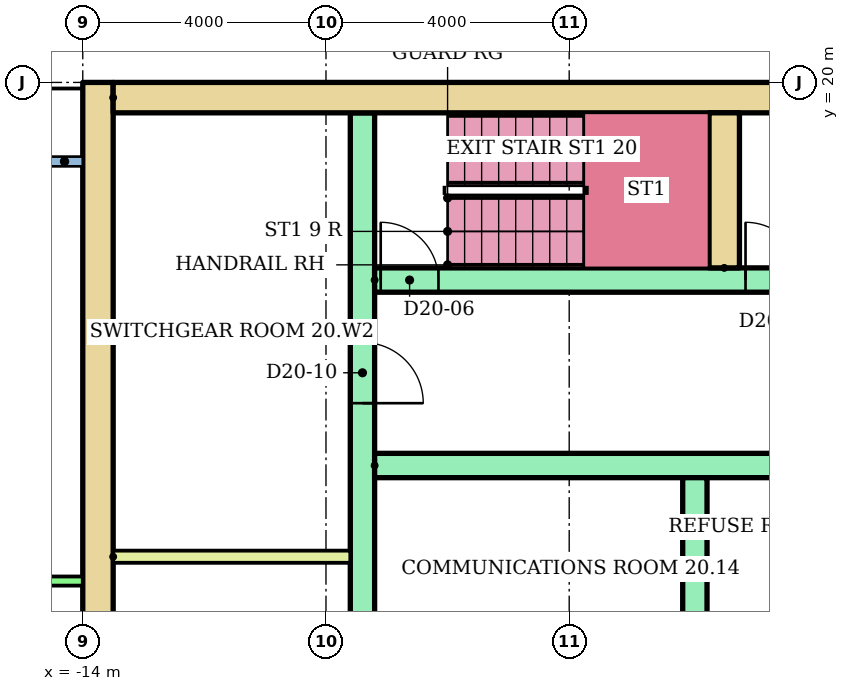
"""IFC4 building model, lengths in metres.
Left out: names, types, materials, properties, quantities, classifications, styles, units other than length and angle.
Written with IfcOpenShell. Run it as: python <this file> out.ifc"""

import sys

from ifc_helpers import new_model, si_unit, direction, frame, frame_2d, origin, place, context, subcontext, project, spatial, rectangle, extrude, element, fill, save


model = new_model("IFC4")
c1 = context("Model", 3, precision=1e-05, world=origin(), true_north=direction((0.0, 1.0)))
c2 = subcontext(c1, "Body", "Model", "MODEL_VIEW")
j1 = project(units=[si_unit("LENGTHUNIT", "METRE"), si_unit("PLANEANGLEUNIT", "RADIAN")], contexts=[c1])
p1 = place(None, origin())
s1 = spatial("IfcSite", under=j1, at=p1, CompositionType="ELEMENT")
p2 = place(p1, origin())
s2 = spatial("IfcBuilding", under=s1, at=p2, CompositionType="ELEMENT")
p3 = place(p2, frame((0.0, 0.0, 80.7)))
s3 = spatial("IfcBuildingStorey", under=s2, at=p3, CompositionType="ELEMENT", Elevation=80.7)
p4 = place(p3, frame((-13.75, 3.0, 0.0), z_axis=(0.0, 0.0, 1.0), x_axis=(0.0, 1.0, 0.0)))
e1 = element("IfcWall", 1, at=p4, inside=s3, PredefinedType="SHEAR", context=c2, shape_type="SweptSolid", body=[
    extrude(rectangle(XDim=17.0, YDim=0.5, at=frame_2d((8.5, 0.0))), origin(), (0.0, 0.0, 1.0), 2.92),
])
p5 = place(p3, frame((-13.5, 19.75, 0.0)))
e2 = element("IfcWall", 2, at=p5, inside=s3, PredefinedType="SHEAR", context=c2, shape_type="SweptSolid", body=[
    extrude(rectangle(XDim=27.0, YDim=0.5, at=frame_2d((13.5, 0.0))), origin(), (0.0, 0.0, 1.0), 2.92),
])
p6 = place(p3, frame((-9.4, 6.8, 0.0), z_axis=(0.0, 0.0, 1.0), x_axis=(0.0, 1.0, 0.0)))
e3 = element("IfcWall", 3, at=p6, inside=s3, PredefinedType="SHEAR", context=c2, shape_type="SweptSolid", body=[
    extrude(rectangle(XDim=12.7, YDim=0.4, at=frame_2d((6.35, 0.0))), origin(), (0.0, 0.0, 1.0), 2.92),
])
p7 = place(p6, frame((1.15, 0.0, 0.0)))
e4 = element("IfcOpeningElement", 4, at=p7, cuts=e3, PredefinedType="OPENING", context=c2, shape_type="SweptSolid", body=[
    extrude(rectangle(XDim=1.0, YDim=2.1, at=frame_2d((0.5, 1.05))), frame((0.0, 0.21, 0.0), z_axis=(0.0, -1.0, 0.0), x_axis=(1.0, 0.0, 0.0)), (0.0, 0.0, 1.0), 0.42),
])
p8 = place(p6, frame((7.925, 0.0, 0.0)))
e5 = element("IfcOpeningElement", 5, at=p8, cuts=e3, PredefinedType="OPENING", context=c2, shape_type="SweptSolid", body=[
    extrude(rectangle(XDim=1.0, YDim=2.1, at=frame_2d((0.5, 1.05))), frame((0.0, 0.21, 0.0), z_axis=(0.0, -1.0, 0.0), x_axis=(1.0, 0.0, 0.0)), (0.0, 0.0, 1.0), 0.42),
])
p9 = place(p3, frame((-9.2, 13.7, 0.0)))
e6 = element("IfcWall", 6, at=p9, inside=s3, PredefinedType="SHEAR", context=c2, shape_type="SweptSolid", body=[
    extrude(rectangle(XDim=8.0, YDim=0.4, at=frame_2d((4.0, 0.0))), origin(), (0.0, 0.0, 1.0), 2.92),
])
p10 = place(p3, frame((-3.933, 10.5, 0.0), z_axis=(0.0, 0.0, 1.0), x_axis=(0.0, 1.0, 0.0)))
e7 = element("IfcWall", 7, at=p10, inside=s3, PredefinedType="SHEAR", context=c2, shape_type="SweptSolid", body=[
    extrude(rectangle(XDim=3.0, YDim=0.4, at=frame_2d((1.5, 0.0))), origin(), (0.0, 0.0, 1.0), 2.92),
])
p11 = place(p3, frame((-9.2, 16.75, 0.0)))
e8 = element("IfcWall", 8, at=p11, inside=s3, PredefinedType="SHEAR", context=c2, shape_type="SweptSolid", body=[
    extrude(rectangle(XDim=18.4, YDim=0.4, at=frame_2d((9.2, 0.0))), origin(), (0.0, 0.0, 1.0), 2.92),
])
p12 = place(p11, frame((0.1, 0.0, 0.0)))
e9 = element("IfcOpeningElement", 9, at=p12, cuts=e8, PredefinedType="OPENING", context=c2, shape_type="SweptSolid", body=[
    extrude(rectangle(XDim=0.95, YDim=2.1, at=frame_2d((0.475, 1.05))), frame((0.0, 0.21, 0.0), z_axis=(0.0, -1.0, 0.0), x_axis=(1.0, 0.0, 0.0)), (0.0, 0.0, 1.0), 0.42),
])
p13 = place(p11, frame((6.1, 0.0, 0.0)))
e10 = element("IfcOpeningElement", 10, at=p13, cuts=e8, PredefinedType="OPENING", context=c2, shape_type="SweptSolid", body=[
    extrude(rectangle(XDim=0.95, YDim=2.1, at=frame_2d((0.475, 1.05))), frame((0.0, 0.21, 0.0), z_axis=(0.0, -1.0, 0.0), x_axis=(1.0, 0.0, 0.0)), (0.0, 0.0, 1.0), 0.42),
])
p14 = place(p11, frame((12.1, 0.0, 0.0)))
e11 = element("IfcOpeningElement", 11, at=p14, cuts=e8, PredefinedType="OPENING", context=c2, shape_type="SweptSolid", body=[
    extrude(rectangle(XDim=0.95, YDim=2.1, at=frame_2d((0.475, 1.05))), frame((0.0, 0.21, 0.0), z_axis=(0.0, -1.0, 0.0), x_axis=(1.0, 0.0, 0.0)), (0.0, 0.0, 1.0), 0.42),
])
p15 = place(p3, frame((-3.45, 16.95, 0.0), z_axis=(0.0, 0.0, 1.0), x_axis=(0.0, 1.0, 0.0)))
e12 = element("IfcWall", 12, at=p15, inside=s3, PredefinedType="SHEAR", context=c2, shape_type="SweptSolid", body=[
    extrude(rectangle(XDim=2.55, YDim=0.5, at=frame_2d((1.275, 0.0))), origin(), (0.0, 0.0, 1.0), 2.92),
])
p16 = place(p3, frame((-13.5, 12.2, 0.0)))
e13 = element("IfcWall", 13, at=p16, inside=s3, PredefinedType="PARTITIONING", context=c2, shape_type="SweptSolid", body=[
    extrude(rectangle(XDim=3.9, YDim=0.2, at=frame_2d((1.95, 0.0))), origin(), (0.0, 0.0, 1.0), 2.92),
])
p17 = place(p3, frame((-28.62, 11.8, 0.0)))
e14 = element("IfcWall", 14, at=p17, inside=s3, PredefinedType="PARTITIONING", context=c2, shape_type="SweptSolid", body=[
    extrude(rectangle(XDim=14.62, YDim=0.15, at=frame_2d((7.31, 0.0))), origin(), (0.0, 0.0, 1.0), 2.4),
])
p18 = place(p17, frame((1.97, 0.0, 0.0)))
e15 = element("IfcOpeningElement", 15, at=p18, cuts=e14, PredefinedType="OPENING", context=c2, shape_type="SweptSolid", body=[
    extrude(rectangle(XDim=1.0, YDim=2.1, at=frame_2d((0.5, 1.05))), frame((0.0, 0.085, 0.0), z_axis=(0.0, -1.0, 0.0), x_axis=(1.0, 0.0, 0.0)), (0.0, 0.0, 1.0), 0.17),
])
p19 = place(p17, frame((9.22, 0.0, 0.0)))
e16 = element("IfcOpeningElement", 16, at=p19, cuts=e14, PredefinedType="OPENING", context=c2, shape_type="SweptSolid", body=[
    extrude(rectangle(XDim=0.9, YDim=2.1, at=frame_2d((0.45, 1.05))), frame((0.0, 0.085, 0.0), z_axis=(0.0, -1.0, 0.0), x_axis=(1.0, 0.0, 0.0)), (0.0, 0.0, 1.0), 0.17),
])
p20 = place(p12, origin())
e17 = element("IfcDoor", 17, at=p20, inside=s3, OperationType="SINGLE_SWING_LEFT", PredefinedType="DOOR", context=c2, shape_type="SweptSolid", body=[
    extrude(rectangle(XDim=0.95, YDim=2.1, at=frame_2d((0.475, 1.05))), frame((0.0, 0.025, 0.0), z_axis=(0.0, -1.0, 0.0), x_axis=(1.0, 0.0, 0.0)), (0.0, 0.0, 1.0), 0.05),
])
fill(e9, e17)
p21 = place(p13, origin())
e18 = element("IfcDoor", 18, at=p21, inside=s3, OperationType="SINGLE_SWING_LEFT", PredefinedType="DOOR", context=c2, shape_type="SweptSolid", body=[
    extrude(rectangle(XDim=0.95, YDim=2.1, at=frame_2d((0.475, 1.05))), frame((0.0, 0.025, 0.0), z_axis=(0.0, -1.0, 0.0), x_axis=(1.0, 0.0, 0.0)), (0.0, 0.0, 1.0), 0.05),
])
fill(e10, e18)
p22 = place(p8, frame((1.0, 0.0, 0.0), z_axis=(0.0, 0.0, 1.0), x_axis=(-1.0, 0.0, 0.0)))
e19 = element("IfcDoor", 19, at=p22, inside=s3, OperationType="SINGLE_SWING_LEFT", PredefinedType="DOOR", context=c2, shape_type="SweptSolid", body=[
    extrude(rectangle(XDim=1.0, YDim=2.1, at=frame_2d((0.5, 1.05))), frame((0.0, 0.025, 0.0), z_axis=(0.0, -1.0, 0.0), x_axis=(1.0, 0.0, 0.0)), (0.0, 0.0, 1.0), 0.05),
])
fill(e5, e19)
save(model, sys.argv[1])
